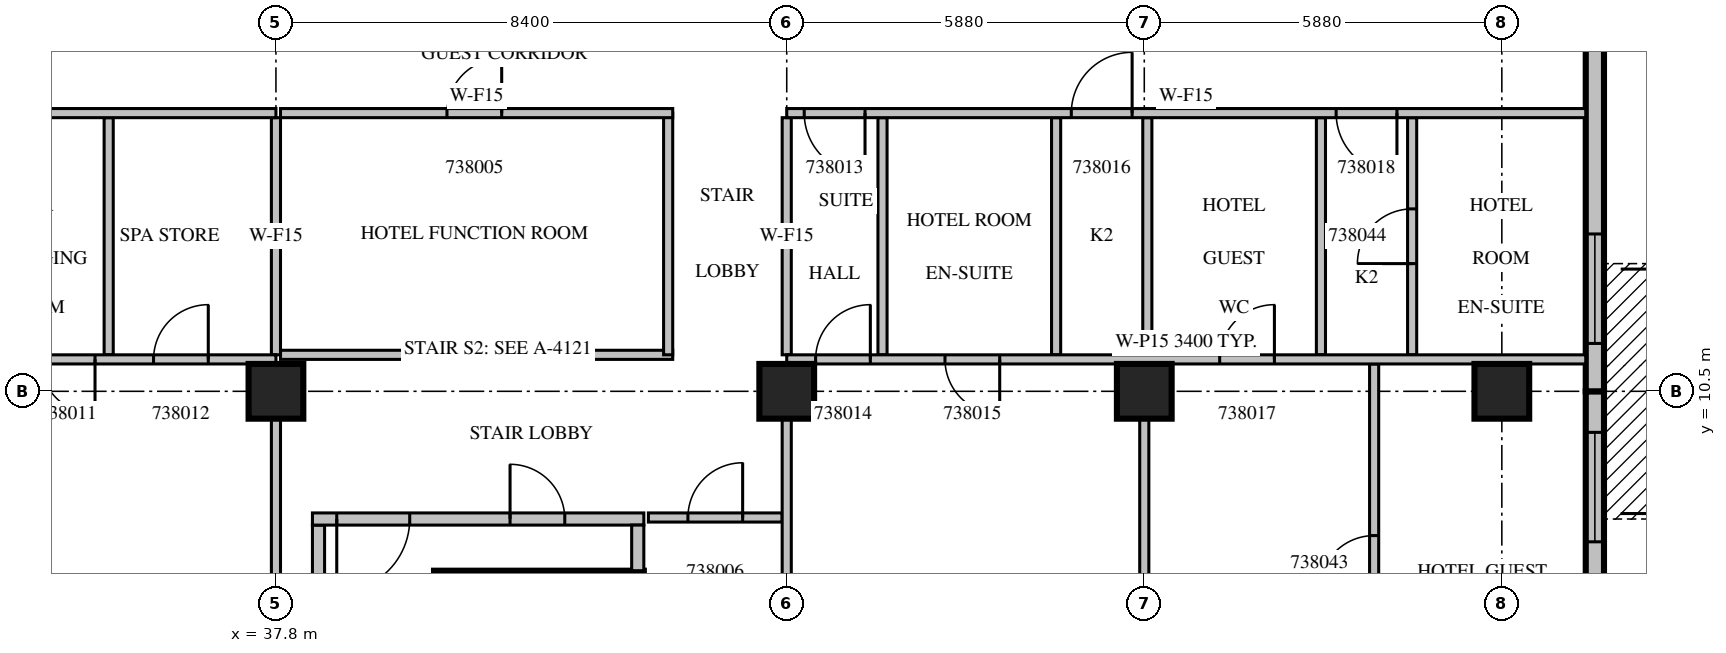
"""IFC4 building model, lengths in metres.
Left out: names, types, materials, properties, quantities, classifications, styles, units other than length and angle.
Written with IfcOpenShell. Run it as: python <this file> out.ifc"""

import sys

from ifc_helpers import new_model, si_unit, direction, frame, frame_2d, origin, origin_2d, place, context, subcontext, project, spatial, rectangle, extrude, source, transform, mapped, element, fill, save


model = new_model("IFC4")
c1 = context("Model", 3, precision=1e-05, world=origin(), true_north=direction((0.0, 1.0)))
c2 = subcontext(c1, "Body", "Model", "MODEL_VIEW")
j1 = project(units=[si_unit("LENGTHUNIT", "METRE"), si_unit("PLANEANGLEUNIT", "RADIAN")], contexts=[c1])
p1 = place(None, origin())
s1 = spatial("IfcSite", under=j1, at=p1, CompositionType="ELEMENT")
p2 = place(p1, origin())
s2 = spatial("IfcBuilding", under=s1, at=p2, CompositionType="ELEMENT")
p3 = place(p2, frame((0.0, 0.0, 177.8)))
s3 = spatial("IfcBuildingStorey", under=s2, at=p3, CompositionType="ELEMENT", Elevation=177.8)
m1 = source(origin(), c2, "Body", "SweptSolid", [
    extrude(rectangle(XDim=0.9, YDim=0.9, at=origin_2d()), origin(), (0.0, 0.0, 1.0), 3.8),
])
for number, where, z_axis, x_axis in (
    (1, (37.8, 10.5, 0.0), (0.0, 0.0, 1.0), (1.0, 0.0, 0.0)),
    (2, (46.2, 10.5, 0.0), (0.0, 0.0, 1.0), (1.0, 0.0, 0.0)),
    (3, (52.08, 10.5, 0.0), (0.0, 0.0, 1.0), (1.0, 0.0, 0.0)),
    (4, (57.96, 10.5, 0.0), (0.0, 0.0, 1.0), (1.0, 0.0, 0.0)),
):
    element("IfcColumn", number, at=place(p3, frame(where, z_axis=z_axis, x_axis=x_axis)), inside=s3, PredefinedType="COLUMN", context=c2, shape_type="MappedRepresentation", body=[
        mapped(m1, transform((0.0, 0.0, 0.0), scale=1.0)),
    ])
p4 = place(p3, frame((59.49, 4.2, 0.0), z_axis=(0.0, 0.0, 1.0), x_axis=(0.0, 1.0, 0.0)))
e5 = element("IfcWall", 5, at=p4, inside=s3, PredefinedType="STANDARD", context=c2, shape_type="SweptSolid", body=[
    extrude(rectangle(XDim=6.3, YDim=0.3, at=frame_2d((3.15, 0.0))), origin(), (0.0, 0.0, 1.0), 3.4),
])
m2 = source(origin(), c2, "Body", "SweptSolid", [
    extrude(rectangle(XDim=1.8, YDim=2.3, at=frame_2d((0.9, 1.15))), frame((0.0, 0.16, 0.0), z_axis=(0.0, -1.0, 0.0), x_axis=(1.0, 0.0, 0.0)), (0.0, 0.0, 1.0), 0.32),
])
p5 = place(p4, frame((0.675, 0.0, 0.6)))
e6 = element("IfcOpeningElement", 6, at=p5, cuts=e5, PredefinedType="OPENING", context=c2, shape_type="MappedRepresentation", body=[
    mapped(m2, transform((0.0, 0.0, 0.0), scale=1.0)),
])
m3 = source(origin(), c2, "Body", "SweptSolid", [
    extrude(rectangle(XDim=1.8, YDim=2.4, at=frame_2d((0.9, 1.2))), frame((0.0, 0.16, 0.0), z_axis=(0.0, -1.0, 0.0), x_axis=(1.0, 0.0, 0.0)), (0.0, 0.0, 1.0), 0.32),
])
p6 = place(p4, frame((3.825, 0.0, 0.0)))
e7 = element("IfcOpeningElement", 7, at=p6, cuts=e5, PredefinedType="OPENING", context=c2, shape_type="MappedRepresentation", body=[
    mapped(m3, transform((0.0, 0.0, 0.0), scale=1.0)),
])
p7 = place(p3, frame((59.49, 10.5, 0.0), z_axis=(0.0, 0.0, 1.0), x_axis=(0.0, 1.0, 0.0)))
e8 = element("IfcWall", 8, at=p7, inside=s3, PredefinedType="STANDARD", context=c2, shape_type="SweptSolid", body=[
    extrude(rectangle(XDim=6.75, YDim=0.3, at=frame_2d((3.375, 0.0))), origin(), (0.0, 0.0, 1.0), 3.4),
])
p8 = place(p7, frame((0.787, 0.0, 0.0)))
e9 = element("IfcOpeningElement", 9, at=p8, cuts=e8, PredefinedType="OPENING", context=c2, shape_type="MappedRepresentation", body=[
    mapped(m3, transform((0.0, 0.0, 0.0), scale=1.0)),
])
p9 = place(p3, frame((40.4, 7.425, 0.0), z_axis=(0.0, 0.0, 1.0), x_axis=(1.0, 0.0, 0.0)))
e10 = element("IfcWall", 10, at=p9, inside=s3, PredefinedType="SOLIDWALL", context=c2, shape_type="SweptSolid", body=[
    extrude(rectangle(XDim=3.45, YDim=0.25, at=frame_2d((1.725, 0.0))), origin(), (0.0, 0.0, 1.0), 3.4),
])
p10 = place(p3, frame((38.5, 0.3, 0.0), z_axis=(0.0, 0.0, 1.0), x_axis=(0.0, 1.0, 0.0)))
e11 = element("IfcWall", 11, at=p10, inside=s3, PredefinedType="PARTITIONING", context=c2, shape_type="SweptSolid", body=[
    extrude(rectangle(XDim=8.0, YDim=0.2, at=frame_2d((4.0, 0.0))), origin(), (0.0, 0.0, 1.0), 3.4),
])
p11 = place(p3, frame((38.4, 8.4, 0.0), z_axis=(0.0, 0.0, 1.0), x_axis=(1.0, 0.0, 0.0)))
e12 = element("IfcWall", 12, at=p11, inside=s3, PredefinedType="PARTITIONING", context=c2, shape_type="SweptSolid", body=[
    extrude(rectangle(XDim=5.45, YDim=0.2, at=frame_2d((2.725, 0.0))), origin(), (0.0, 0.0, 1.0), 3.4),
])
m4 = source(origin(), c2, "Body", "SweptSolid", [
    extrude(rectangle(XDim=1.2, YDim=2.1, at=frame_2d((0.6, 1.05))), frame((0.0, 0.11, 0.0), z_axis=(0.0, -1.0, 0.0), x_axis=(1.0, 0.0, 0.0)), (0.0, 0.0, 1.0), 0.22),
])
p12 = place(p11, frame((0.4, 0.0, 0.0)))
e13 = element("IfcOpeningElement", 13, at=p12, cuts=e12, PredefinedType="OPENING", context=c2, shape_type="MappedRepresentation", body=[
    mapped(m4, transform((0.0, 0.0, 0.0), scale=1.0)),
])
m5 = source(origin(), c2, "Body", "SweptSolid", [
    extrude(rectangle(XDim=0.9, YDim=2.1, at=frame_2d((0.45, 1.05))), frame((0.0, 0.11, 0.0), z_axis=(0.0, -1.0, 0.0), x_axis=(1.0, 0.0, 0.0)), (0.0, 0.0, 1.0), 0.22),
])
p13 = place(p11, frame((3.25, 0.0, 0.0)))
e14 = element("IfcOpeningElement", 14, at=p13, cuts=e12, PredefinedType="OPENING", context=c2, shape_type="MappedRepresentation", body=[
    mapped(m5, transform((0.0, 0.0, 0.0), scale=1.0)),
])
p14 = place(p3, frame((43.75, 7.55, 0.0), z_axis=(0.0, 0.0, 1.0), x_axis=(0.0, 1.0, 0.0)))
e15 = element("IfcWall", 15, at=p14, inside=s3, PredefinedType="PARTITIONING", context=c2, shape_type="SweptSolid", body=[
    extrude(rectangle(XDim=0.75, YDim=0.2, at=frame_2d((0.375, 0.0))), origin(), (0.0, 0.0, 1.0), 3.4),
])
p15 = place(p3, frame((37.875, 11.1, 0.0), z_axis=(0.0, 0.0, 1.0), x_axis=(1.0, 0.0, 0.0)))
e16 = element("IfcWall", 16, at=p15, inside=s3, PredefinedType="PARTITIONING", context=c2, shape_type="SweptSolid", body=[
    extrude(rectangle(XDim=6.45, YDim=0.15, at=frame_2d((3.225, 0.0))), origin(), (0.0, 0.0, 1.0), 3.4),
])
p16 = place(p3, frame((44.25, 11.1, 0.0), z_axis=(0.0, 0.0, 1.0), x_axis=(0.0, 1.0, 0.0)))
e17 = element("IfcWall", 17, at=p16, inside=s3, PredefinedType="PARTITIONING", context=c2, shape_type="SweptSolid", body=[
    extrude(rectangle(XDim=3.975, YDim=0.15, at=frame_2d((1.988, 0.0))), origin(), (0.0, 0.0, 1.0), 3.4),
])
m6 = source(origin(), c2, "Body", "SweptSolid", [
    extrude(rectangle(XDim=6.45, YDim=0.15, at=frame_2d((3.225, 0.0))), origin(), (0.0, 0.0, 1.0), 3.4),
])
p17 = place(p3, frame((44.325, 15.075, 0.0), z_axis=(0.0, 0.0, 1.0), x_axis=(-1.0, 0.0, 0.0)))
e18 = element("IfcWall", 18, at=p17, inside=s3, PredefinedType="PARTITIONING", context=c2, shape_type="MappedRepresentation", body=[
    mapped(m6, transform((0.0, 0.0, 0.0), scale=1.0)),
])
m7 = source(origin(), c2, "Body", "SweptSolid", [
    extrude(rectangle(XDim=0.9, YDim=2.1, at=frame_2d((0.45, 1.05))), frame((0.0, 0.085, 0.0), z_axis=(0.0, -1.0, 0.0), x_axis=(1.0, 0.0, 0.0)), (0.0, 0.0, 1.0), 0.17),
])
p18 = place(p17, frame((2.812, 0.0, 0.0)))
e19 = element("IfcOpeningElement", 19, at=p18, cuts=e18, PredefinedType="OPENING", context=c2, shape_type="MappedRepresentation", body=[
    mapped(m7, transform((0.0, 0.0, 0.0), scale=1.0)),
])
p19 = place(p3, frame((46.125, 8.425, 0.0), z_axis=(0.0, 0.0, 1.0), x_axis=(-1.0, 0.0, 0.0)))
e20 = element("IfcWall", 20, at=p19, inside=s3, PredefinedType="PARTITIONING", context=c2, shape_type="SweptSolid", body=[
    extrude(rectangle(XDim=2.2, YDim=0.15, at=frame_2d((1.1, 0.0))), origin(), (0.0, 0.0, 1.0), 3.4),
])
p20 = place(p19, frame((0.65, 0.0, 0.0)))
e21 = element("IfcOpeningElement", 21, at=p20, cuts=e20, PredefinedType="OPENING", context=c2, shape_type="MappedRepresentation", body=[
    mapped(m7, transform((0.0, 0.0, 0.0), scale=1.0)),
])
m8 = source(origin(), c2, "Body", "SweptSolid", [
    extrude(rectangle(XDim=3.9, YDim=0.15, at=frame_2d((1.95, 0.0))), origin(), (0.0, 0.0, 1.0), 3.4),
])
p21 = place(p3, frame((35.049, 11.1, 0.0), z_axis=(0.0, 0.0, 1.0), x_axis=(0.0, 1.0, 0.0)))
e22 = element("IfcWall", 22, at=p21, inside=s3, PredefinedType="PARTITIONING", context=c2, shape_type="MappedRepresentation", body=[
    mapped(m8, transform((0.0, 0.0, 0.0), scale=1.0)),
])
p22 = place(p3, frame((37.8, 0.899, 0.0), z_axis=(0.0, 0.0, 1.0), x_axis=(0.0, 1.0, 0.0)))
e23 = element("IfcWall", 23, at=p22, inside=s3, PredefinedType="PARTITIONING", context=c2, shape_type="SweptSolid", body=[
    extrude(rectangle(XDim=9.152, YDim=0.15, at=frame_2d((4.576, 0.0))), origin(), (0.0, 0.0, 1.0), 3.4),
])
p23 = place(p3, frame((37.8, 11.1, 0.0), z_axis=(0.0, 0.0, 1.0), x_axis=(0.0, 1.0, 0.0)))
e24 = element("IfcWall", 24, at=p23, inside=s3, PredefinedType="PARTITIONING", context=c2, shape_type="MappedRepresentation", body=[
    mapped(m8, transform((0.0, 0.0, 0.0), scale=1.0)),
])
p24 = place(p3, frame((37.8, 11.025, 0.0), z_axis=(0.0, 0.0, 1.0), x_axis=(-1.0, 0.0, 0.0)))
e25 = element("IfcWall", 25, at=p24, inside=s3, PredefinedType="PARTITIONING", context=c2, shape_type="SweptSolid", body=[
    extrude(rectangle(XDim=8.4, YDim=0.15, at=frame_2d((4.2, 0.0))), origin(), (0.0, 0.0, 1.0), 3.4),
])
p25 = place(p24, frame((6.082, 0.0, 0.0)))
e26 = element("IfcOpeningElement", 26, at=p25, cuts=e25, PredefinedType="OPENING", context=c2, shape_type="MappedRepresentation", body=[
    mapped(m7, transform((0.0, 0.0, 0.0), scale=1.0)),
])
p26 = place(p24, frame((7.04, 0.0, 0.0)))
e27 = element("IfcOpeningElement", 27, at=p26, cuts=e25, PredefinedType="OPENING", context=c2, shape_type="MappedRepresentation", body=[
    mapped(m7, transform((0.0, 0.0, 0.0), scale=1.0)),
])
p27 = place(p24, frame((2.975, 0.0, 0.0)))
e28 = element("IfcOpeningElement", 28, at=p27, cuts=e25, PredefinedType="OPENING", context=c2, shape_type="MappedRepresentation", body=[
    mapped(m7, transform((0.0, 0.0, 0.0), scale=1.0)),
])
p28 = place(p24, frame((1.113, 0.0, 0.0)))
e29 = element("IfcOpeningElement", 29, at=p28, cuts=e25, PredefinedType="OPENING", context=c2, shape_type="MappedRepresentation", body=[
    mapped(m7, transform((0.0, 0.0, 0.0), scale=1.0)),
])
m9 = source(origin(), c2, "Body", "SweptSolid", [
    extrude(rectangle(XDim=9.152, YDim=0.15, at=frame_2d((4.576, 0.0))), origin(), (0.0, 0.0, 1.0), 3.4),
])
p29 = place(p3, frame((52.08, 0.899, 0.0), z_axis=(0.0, 0.0, 1.0), x_axis=(0.0, 1.0, 0.0)))
e30 = element("IfcWall", 30, at=p29, inside=s3, PredefinedType="PARTITIONING", context=c2, shape_type="MappedRepresentation", body=[
    mapped(m9, transform((0.0, 0.0, 0.0), scale=1.0)),
])
p30 = place(p29, frame((4.126, 0.0, 0.0)))
e31 = element("IfcOpeningElement", 31, at=p30, cuts=e30, PredefinedType="OPENING", context=c2, shape_type="MappedRepresentation", body=[
    mapped(m7, transform((0.0, 0.0, 0.0), scale=1.0)),
])
p31 = place(p3, frame((55.86, 4.405, 0.0), z_axis=(0.0, 0.0, 1.0), x_axis=(0.0, 1.0, 0.0)))
e32 = element("IfcWall", 32, at=p31, inside=s3, PredefinedType="PARTITIONING", context=c2, shape_type="SweptSolid", body=[
    extrude(rectangle(XDim=6.545, YDim=0.15, at=frame_2d((3.272, 0.0))), origin(), (0.0, 0.0, 1.0), 3.4),
])
p32 = place(p31, frame((2.822, 0.0, 0.0)))
e33 = element("IfcOpeningElement", 33, at=p32, cuts=e32, PredefinedType="OPENING", context=c2, shape_type="MappedRepresentation", body=[
    mapped(m7, transform((0.0, 0.0, 0.0), scale=1.0)),
])
for number, where, z_axis, x_axis in (
    (34, (47.775, 11.1, 0.0), (0.0, 0.0, 1.0), (0.0, 1.0, 0.0)),
    (35, (50.63, 11.1, 0.0), (0.0, 0.0, 1.0), (0.0, 1.0, 0.0)),
    (36, (52.13, 11.1, 0.0), (0.0, 0.0, 1.0), (0.0, 1.0, 0.0)),
    (37, (54.985, 11.1, 0.0), (0.0, 0.0, 1.0), (0.0, 1.0, 0.0)),
):
    element("IfcWall", number, at=place(p3, frame(where, z_axis=z_axis, x_axis=x_axis)), inside=s3, PredefinedType="PARTITIONING", context=c2, shape_type="MappedRepresentation", body=[
        mapped(m8, transform((0.0, 0.0, 0.0), scale=1.0)),
    ])
p33 = place(p3, frame((56.485, 11.1, 0.0), z_axis=(0.0, 0.0, 1.0), x_axis=(0.0, 1.0, 0.0)))
e38 = element("IfcWall", 38, at=p33, inside=s3, PredefinedType="PARTITIONING", context=c2, shape_type="MappedRepresentation", body=[
    mapped(m8, transform((0.0, 0.0, 0.0), scale=1.0)),
])
p34 = place(p33, frame((1.5, 0.0, 0.0)))
e39 = element("IfcOpeningElement", 39, at=p34, cuts=e38, PredefinedType="OPENING", context=c2, shape_type="MappedRepresentation", body=[
    mapped(m7, transform((0.0, 0.0, 0.0), scale=1.0)),
])
p35 = place(p3, frame((46.2, 0.899, 0.0), z_axis=(0.0, 0.0, 1.0), x_axis=(0.0, 1.0, 0.0)))
e40 = element("IfcWall", 40, at=p35, inside=s3, PredefinedType="PARTITIONING", context=c2, shape_type="MappedRepresentation", body=[
    mapped(m9, transform((0.0, 0.0, 0.0), scale=1.0)),
])
p36 = place(p3, frame((46.2, 11.1, 0.0), z_axis=(0.0, 0.0, 1.0), x_axis=(0.0, 1.0, 0.0)))
e41 = element("IfcWall", 41, at=p36, inside=s3, PredefinedType="PARTITIONING", context=c2, shape_type="MappedRepresentation", body=[
    mapped(m8, transform((0.0, 0.0, 0.0), scale=1.0)),
])
p37 = place(p3, frame((59.34, 11.025, 0.0), z_axis=(0.0, 0.0, 1.0), x_axis=(-1.0, 0.0, 0.0)))
e42 = element("IfcWall", 42, at=p37, inside=s3, PredefinedType="PARTITIONING", context=c2, shape_type="SweptSolid", body=[
    extrude(rectangle(XDim=13.14, YDim=0.15, at=frame_2d((6.57, 0.0))), origin(), (0.0, 0.0, 1.0), 3.4),
])
p38 = place(p37, frame((11.765, 0.0, 0.0)))
e43 = element("IfcOpeningElement", 43, at=p38, cuts=e42, PredefinedType="OPENING", context=c2, shape_type="MappedRepresentation", body=[
    mapped(m7, transform((0.0, 0.0, 0.0), scale=1.0)),
])
p39 = place(p37, frame((9.637, 0.0, 0.0)))
e44 = element("IfcOpeningElement", 44, at=p39, cuts=e42, PredefinedType="OPENING", context=c2, shape_type="MappedRepresentation", body=[
    mapped(m7, transform((0.0, 0.0, 0.0), scale=1.0)),
])
p40 = place(p37, frame((5.12, 0.0, 0.0)))
e45 = element("IfcOpeningElement", 45, at=p40, cuts=e42, PredefinedType="OPENING", context=c2, shape_type="MappedRepresentation", body=[
    mapped(m7, transform((0.0, 0.0, 0.0), scale=1.0)),
])
m10 = source(origin(), c2, "Body", "SweptSolid", [
    extrude(rectangle(XDim=8.4, YDim=0.15, at=frame_2d((4.2, 0.0))), origin(), (0.0, 0.0, 1.0), 3.4),
])
p41 = place(p3, frame((37.8, 15.075, 0.0), z_axis=(0.0, 0.0, 1.0), x_axis=(-1.0, 0.0, 0.0)))
e46 = element("IfcWall", 46, at=p41, inside=s3, PredefinedType="PARTITIONING", context=c2, shape_type="MappedRepresentation", body=[
    mapped(m10, transform((0.0, 0.0, 0.0), scale=1.0)),
])
m11 = source(origin(), c2, "Body", "SweptSolid", [
    extrude(rectangle(XDim=1.2, YDim=2.1, at=frame_2d((0.6, 1.05))), frame((0.0, 0.085, 0.0), z_axis=(0.0, -1.0, 0.0), x_axis=(1.0, 0.0, 0.0)), (0.0, 0.0, 1.0), 0.17),
])
p42 = place(p41, frame((6.17, 0.0, 0.0)))
e47 = element("IfcOpeningElement", 47, at=p42, cuts=e46, PredefinedType="OPENING", context=c2, shape_type="MappedRepresentation", body=[
    mapped(m11, transform((0.0, 0.0, 0.0), scale=1.0)),
])
m12 = source(origin(), c2, "Body", "SweptSolid", [
    extrude(rectangle(XDim=13.14, YDim=0.15, at=frame_2d((6.57, 0.0))), origin(), (0.0, 0.0, 1.0), 3.4),
])
p43 = place(p3, frame((59.34, 15.075, 0.0), z_axis=(0.0, 0.0, 1.0), x_axis=(-1.0, 0.0, 0.0)))
e48 = element("IfcWall", 48, at=p43, inside=s3, PredefinedType="PARTITIONING", context=c2, shape_type="MappedRepresentation", body=[
    mapped(m12, transform((0.0, 0.0, 0.0), scale=1.0)),
])
m13 = source(origin(), c2, "Body", "SweptSolid", [
    extrude(rectangle(XDim=1.0, YDim=2.1, at=frame_2d((0.5, 1.05))), frame((0.0, 0.085, 0.0), z_axis=(0.0, -1.0, 0.0), x_axis=(1.0, 0.0, 0.0)), (0.0, 0.0, 1.0), 0.17),
])
p44 = place(p43, frame((11.852, 0.0, 0.0)))
e49 = element("IfcOpeningElement", 49, at=p44, cuts=e48, PredefinedType="OPENING", context=c2, shape_type="MappedRepresentation", body=[
    mapped(m13, transform((0.0, 0.0, 0.0), scale=1.0)),
])
p45 = place(p43, frame((7.46, 0.0, 0.0)))
e50 = element("IfcOpeningElement", 50, at=p45, cuts=e48, PredefinedType="OPENING", context=c2, shape_type="MappedRepresentation", body=[
    mapped(m13, transform((0.0, 0.0, 0.0), scale=1.0)),
])
p46 = place(p43, frame((3.105, 0.0, 0.0)))
e51 = element("IfcOpeningElement", 51, at=p46, cuts=e48, PredefinedType="OPENING", context=c2, shape_type="MappedRepresentation", body=[
    mapped(m13, transform((0.0, 0.0, 0.0), scale=1.0)),
])
m14 = source(origin(), c2, "Body", "SweptSolid", [
    extrude(rectangle(XDim=1.8, YDim=2.4, at=frame_2d((0.9, 1.2))), frame((0.0, 0.025, 0.0), z_axis=(0.0, -1.0, 0.0), x_axis=(1.0, 0.0, 0.0)), (0.0, 0.0, 1.0), 0.05),
])
p47 = place(p6, origin())
e52 = element("IfcDoor", 52, at=p47, inside=s3, OperationType="SLIDING_TO_LEFT", PredefinedType="DOOR", context=c2, shape_type="MappedRepresentation", body=[
    mapped(m14, transform((0.0, 0.0, 0.0), scale=1.0)),
])
fill(e7, e52)
p48 = place(p8, origin())
e53 = element("IfcDoor", 53, at=p48, inside=s3, OperationType="SLIDING_TO_LEFT", PredefinedType="DOOR", context=c2, shape_type="MappedRepresentation", body=[
    mapped(m14, transform((0.0, 0.0, 0.0), scale=1.0)),
])
fill(e9, e53)
m15 = source(origin(), c2, "Body", "SweptSolid", [
    extrude(rectangle(XDim=1.2, YDim=2.1, at=frame_2d((0.6, 1.05))), frame((0.0, 0.025, 0.0), z_axis=(0.0, -1.0, 0.0), x_axis=(1.0, 0.0, 0.0)), (0.0, 0.0, 1.0), 0.05),
])
p49 = place(p12, origin())
e54 = element("IfcDoor", 54, at=p49, inside=s3, OperationType="SINGLE_SWING_RIGHT", PredefinedType="DOOR", context=c2, shape_type="MappedRepresentation", body=[
    mapped(m15, transform((0.0, 0.0, 0.0), scale=1.0)),
])
fill(e13, e54)
m16 = source(origin(), c2, "Body", "SweptSolid", [
    extrude(rectangle(XDim=0.9, YDim=2.1, at=frame_2d((0.45, 1.05))), frame((0.0, 0.025, 0.0), z_axis=(0.0, -1.0, 0.0), x_axis=(1.0, 0.0, 0.0)), (0.0, 0.0, 1.0), 0.05),
])
p50 = place(p13, origin())
e55 = element("IfcDoor", 55, at=p50, inside=s3, OperationType="SINGLE_SWING_LEFT", PredefinedType="DOOR", context=c2, shape_type="MappedRepresentation", body=[
    mapped(m16, transform((0.0, 0.0, 0.0), scale=1.0)),
])
fill(e14, e55)
p51 = place(p18, origin())
e56 = element("IfcDoor", 56, at=p51, inside=s3, OperationType="SINGLE_SWING_RIGHT", PredefinedType="DOOR", context=c2, shape_type="MappedRepresentation", body=[
    mapped(m16, transform((0.0, 0.0, 0.0), scale=1.0)),
])
fill(e19, e56)
p52 = place(p20, origin())
e57 = element("IfcDoor", 57, at=p52, inside=s3, OperationType="SINGLE_SWING_RIGHT", PredefinedType="DOOR", context=c2, shape_type="MappedRepresentation", body=[
    mapped(m16, transform((0.0, 0.0, 0.0), scale=1.0)),
])
fill(e21, e57)
p53 = place(p27, origin())
e58 = element("IfcDoor", 58, at=p53, inside=s3, OperationType="SINGLE_SWING_LEFT", PredefinedType="DOOR", context=c2, shape_type="MappedRepresentation", body=[
    mapped(m16, transform((0.0, 0.0, 0.0), scale=1.0)),
])
fill(e28, e58)
p54 = place(p28, origin())
e59 = element("IfcDoor", 59, at=p54, inside=s3, OperationType="SINGLE_SWING_RIGHT", PredefinedType="DOOR", context=c2, shape_type="MappedRepresentation", body=[
    mapped(m16, transform((0.0, 0.0, 0.0), scale=1.0)),
])
fill(e29, e59)
m17 = source(origin(), c2, "Body", "SweptSolid", [
    extrude(rectangle(XDim=1.0, YDim=2.1, at=frame_2d((0.5, 1.05))), frame((0.0, 0.025, 0.0), z_axis=(0.0, -1.0, 0.0), x_axis=(1.0, 0.0, 0.0)), (0.0, 0.0, 1.0), 0.05),
])
p55 = place(p44, origin())
e60 = element("IfcDoor", 60, at=p55, inside=s3, OperationType="SINGLE_SWING_LEFT", PredefinedType="DOOR", context=c2, shape_type="MappedRepresentation", body=[
    mapped(m17, transform((0.0, 0.0, 0.0), scale=1.0)),
])
fill(e49, e60)
p56 = place(p38, origin())
e61 = element("IfcDoor", 61, at=p56, inside=s3, OperationType="SINGLE_SWING_RIGHT", PredefinedType="DOOR", context=c2, shape_type="MappedRepresentation", body=[
    mapped(m16, transform((0.0, 0.0, 0.0), scale=1.0)),
])
fill(e43, e61)
p57 = place(p39, origin())
e62 = element("IfcDoor", 62, at=p57, inside=s3, OperationType="SINGLE_SWING_LEFT", PredefinedType="DOOR", context=c2, shape_type="MappedRepresentation", body=[
    mapped(m16, transform((0.0, 0.0, 0.0), scale=1.0)),
])
fill(e44, e62)
p58 = place(p45, origin())
e63 = element("IfcDoor", 63, at=p58, inside=s3, OperationType="SINGLE_SWING_RIGHT", PredefinedType="DOOR", context=c2, shape_type="MappedRepresentation", body=[
    mapped(m17, transform((0.0, 0.0, 0.0), scale=1.0)),
])
fill(e50, e63)
p59 = place(p40, origin())
e64 = element("IfcDoor", 64, at=p59, inside=s3, OperationType="SINGLE_SWING_RIGHT", PredefinedType="DOOR", context=c2, shape_type="MappedRepresentation", body=[
    mapped(m16, transform((0.0, 0.0, 0.0), scale=1.0)),
])
fill(e45, e64)
p60 = place(p46, origin())
e65 = element("IfcDoor", 65, at=p60, inside=s3, OperationType="SINGLE_SWING_LEFT", PredefinedType="DOOR", context=c2, shape_type="MappedRepresentation", body=[
    mapped(m17, transform((0.0, 0.0, 0.0), scale=1.0)),
])
fill(e51, e65)
p61 = place(p32, origin())
e66 = element("IfcDoor", 66, at=p61, inside=s3, OperationType="SINGLE_SWING_LEFT", PredefinedType="DOOR", context=c2, shape_type="MappedRepresentation", body=[
    mapped(m16, transform((0.0, 0.0, 0.0), scale=1.0)),
])
fill(e33, e66)
p62 = place(p34, origin())
e67 = element("IfcDoor", 67, at=p62, inside=s3, OperationType="SINGLE_SWING_LEFT", PredefinedType="DOOR", context=c2, shape_type="MappedRepresentation", body=[
    mapped(m16, transform((0.0, 0.0, 0.0), scale=1.0)),
])
fill(e39, e67)
save(model, sys.argv[1])
